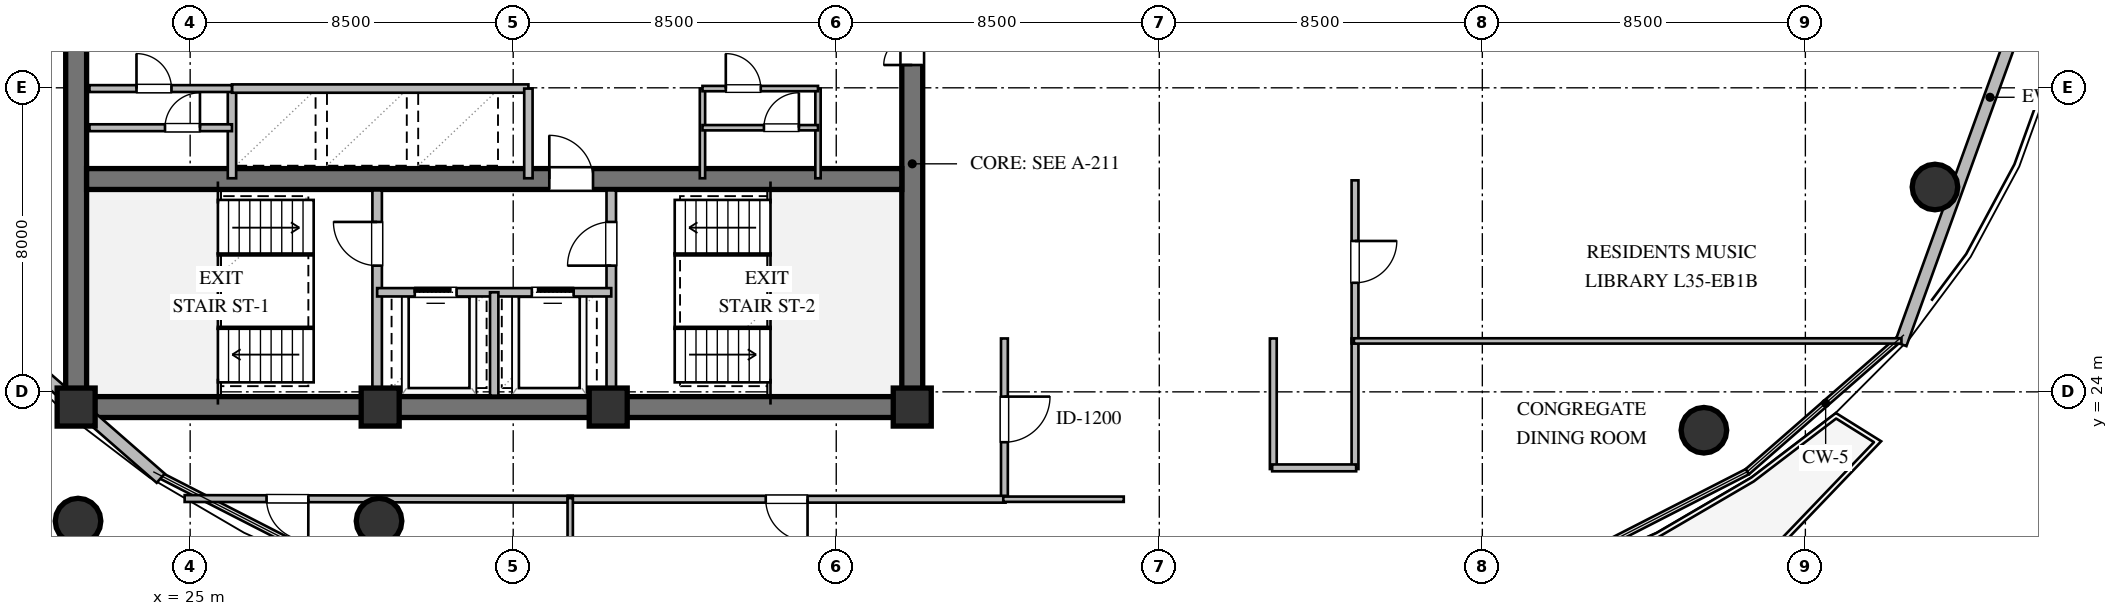
"""IFC4 building model, lengths in metres.
Left out: names, types, materials, properties, quantities, classifications, styles, units other than length and angle.
Written with IfcOpenShell. Run it as: python <this file> out.ifc"""

import sys

from ifc_helpers import new_model, si_unit, direction, frame, frame_2d, origin, origin_2d, place, context, subcontext, project, spatial, rectangle, circle, extrude, element, fill, save


model = new_model("IFC4")
c1 = context("Model", 3, precision=1e-05, world=origin(), true_north=direction((0.0, 1.0)))
c2 = subcontext(c1, "Body", "Model", "MODEL_VIEW")
j1 = project(units=[si_unit("LENGTHUNIT", "METRE"), si_unit("PLANEANGLEUNIT", "RADIAN")], contexts=[c1])
p1 = place(None, origin())
s1 = spatial("IfcSite", under=j1, at=p1, CompositionType="ELEMENT")
p2 = place(p1, origin())
s2 = spatial("IfcBuilding", under=s1, at=p2, CompositionType="ELEMENT")
p3 = place(p2, frame((0.0, 0.0, 135.0)))
s3 = spatial("IfcBuildingStorey", under=s2, at=p3, CompositionType="ELEMENT", Elevation=135.0)
p4 = place(p3, frame((21.725, 23.6, 0.0), z_axis=(0.0, 0.0, 1.0), x_axis=(1.0, 0.0, 0.0)))
e1 = element("IfcWall", 1, at=p4, inside=s3, PredefinedType="SHEAR", context=c2, shape_type="SweptSolid", body=[
    extrude(rectangle(XDim=22.55, YDim=0.55, at=frame_2d((11.275, 0.0))), origin(), (0.0, 0.0, 1.0), 3.36),
])
p5 = place(p3, frame((22.0, 23.875, 0.0), z_axis=(0.0, 0.0, 1.0), x_axis=(0.0, 1.0, 0.0)))
e2 = element("IfcWall", 2, at=p5, inside=s3, PredefinedType="SHEAR", context=c2, shape_type="SweptSolid", body=[
    extrude(rectangle(XDim=12.25, YDim=0.55, at=frame_2d((6.125, 0.0))), origin(), (0.0, 0.0, 1.0), 3.36),
])
p6 = place(p3, frame((44.0, 23.875, 0.0), z_axis=(0.0, 0.0, 1.0), x_axis=(0.0, 1.0, 0.0)))
e3 = element("IfcWall", 3, at=p6, inside=s3, PredefinedType="SHEAR", context=c2, shape_type="SweptSolid", body=[
    extrude(rectangle(XDim=12.25, YDim=0.55, at=frame_2d((6.125, 0.0))), origin(), (0.0, 0.0, 1.0), 3.36),
])
p7 = place(p6, frame((8.725, 0.0, 0.0)))
e4 = element("IfcOpeningElement", 4, at=p7, cuts=e3, PredefinedType="OPENING", context=c2, shape_type="SweptSolid", body=[
    extrude(rectangle(XDim=1.5, YDim=2.15, at=frame_2d((0.75, 1.075))), frame((0.0, 0.285, 0.0), z_axis=(0.0, -1.0, 0.0), x_axis=(1.0, 0.0, 0.0)), (0.0, 0.0, 1.0), 0.57),
])
p8 = place(p3, frame((22.275, 29.6, 0.0), z_axis=(0.0, 0.0, 1.0), x_axis=(1.0, 0.0, 0.0)))
e5 = element("IfcWall", 5, at=p8, inside=s3, PredefinedType="SHEAR", context=c2, shape_type="SweptSolid", body=[
    extrude(rectangle(XDim=21.45, YDim=0.55, at=frame_2d((10.725, 0.0))), origin(), (0.0, 0.0, 1.0), 3.36),
])
p9 = place(p8, frame((12.175, 0.0, 0.0)))
e6 = element("IfcOpeningElement", 6, at=p9, cuts=e5, PredefinedType="OPENING", context=c2, shape_type="SweptSolid", body=[
    extrude(rectangle(XDim=1.15, YDim=2.1, at=frame_2d((0.575, 1.05))), frame((0.0, 0.285, 0.0), z_axis=(0.0, -1.0, 0.0), x_axis=(1.0, 0.0, 0.0)), (0.0, 0.0, 1.0), 0.57),
])
for number, where, z_axis, x_axis in (
    (7, (22.0, 23.6, 0.0), (0.0, 0.0, 1.0), (1.0, 0.0, 0.0)),
    (8, (30.0, 23.6, 0.0), (0.0, 0.0, 1.0), (1.0, 0.0, 0.0)),
    (9, (36.0, 23.6, 0.0), (0.0, 0.0, 1.0), (1.0, 0.0, 0.0)),
    (10, (44.0, 23.6, 0.0), (0.0, 0.0, 1.0), (1.0, 0.0, 0.0)),
):
    element("IfcColumn", number, at=place(p3, frame(where, z_axis=z_axis, x_axis=x_axis)), inside=s3, PredefinedType="COLUMN", context=c2, shape_type="SweptSolid", body=[
        extrude(rectangle(XDim=1.0, YDim=1.0, at=origin_2d()), origin(), (0.0, 0.0, 1.0), 3.6),
    ])
for number, where, z_axis, x_axis in (
    (11, (22.05, 20.6, 0.0), (0.0, 0.0, 1.0), (1.0, 0.0, 0.0)),
    (12, (29.97, 20.6, 0.0), (0.0, 0.0, 1.0), (1.0, 0.0, 0.0)),
    (13, (64.83, 22.99, 0.0), (0.0, 0.0, 1.0), (1.0, 0.0, 0.0)),
    (14, (70.91, 29.39, 0.0), (0.0, 0.0, 1.0), (1.0, 0.0, 0.0)),
):
    element("IfcColumn", number, at=place(p3, frame(where, z_axis=z_axis, x_axis=x_axis)), inside=s3, PredefinedType="COLUMN", context=c2, shape_type="SweptSolid", body=[
        extrude(circle(Radius=0.6, at=origin_2d()), origin(), (0.0, 0.0, 1.0), 3.6),
    ])
p10 = place(p3, frame((74.708, 38.244, 0.0), z_axis=(0.0, 0.0, 1.0), x_axis=(-0.340324669139, -0.94030799187, 0.0)))
e15 = element("IfcWall", 15, at=p10, inside=s3, PredefinedType="STANDARD", context=c2, shape_type="SweptSolid", body=[
    extrude(rectangle(XDim=13.81, YDim=0.32, at=frame_2d((6.905, 0.0))), origin(), (0.0, 0.0, 1.0), 3.36),
])
p11 = place(p3, frame((24.225, 21.727, 0.0), z_axis=(0.0, 0.0, 1.0), x_axis=(-0.753105964003, 0.657899237713, 0.0)))
e16 = element("IfcWall", 16, at=p11, inside=s3, PredefinedType="STANDARD", context=c2, shape_type="SweptSolid", body=[
    extrude(rectangle(XDim=5.998, YDim=0.32, at=frame_2d((2.999, 0.0))), origin(), (0.0, 0.0, 1.0), 2.35),
])
p12 = place(p3, frame((29.92, 23.9, 0.0), z_axis=(0.0, 0.0, 1.0), x_axis=(0.0, 1.0, 0.0)))
e17 = element("IfcWall", 17, at=p12, inside=s3, PredefinedType="SOLIDWALL", context=c2, shape_type="SweptSolid", body=[
    extrude(rectangle(XDim=5.4, YDim=0.25, at=frame_2d((2.7, 0.0))), origin(), (0.0, 0.0, 1.0), 2.89),
])
p13 = place(p12, frame((3.421, 0.0, 0.0)))
e18 = element("IfcOpeningElement", 18, at=p13, cuts=e17, PredefinedType="OPENING", context=c2, shape_type="SweptSolid", body=[
    extrude(rectangle(XDim=1.15, YDim=2.1, at=frame_2d((0.575, 1.05))), frame((0.0, 0.135, 0.0), z_axis=(0.0, -1.0, 0.0), x_axis=(1.0, 0.0, 0.0)), (0.0, 0.0, 1.0), 0.27),
])
p14 = place(p3, frame((36.08, 23.9, 0.0), z_axis=(0.0, 0.0, 1.0), x_axis=(0.0, 1.0, 0.0)))
e19 = element("IfcWall", 19, at=p14, inside=s3, PredefinedType="SOLIDWALL", context=c2, shape_type="SweptSolid", body=[
    extrude(rectangle(XDim=5.4, YDim=0.25, at=frame_2d((2.7, 0.0))), origin(), (0.0, 0.0, 1.0), 3.36),
])
p15 = place(p14, frame((3.421, 0.0, 0.0)))
e20 = element("IfcOpeningElement", 20, at=p15, cuts=e19, PredefinedType="OPENING", context=c2, shape_type="SweptSolid", body=[
    extrude(rectangle(XDim=1.15, YDim=2.1, at=frame_2d((0.575, 1.05))), frame((0.0, 0.135, 0.0), z_axis=(0.0, -1.0, 0.0), x_axis=(1.0, 0.0, 0.0)), (0.0, 0.0, 1.0), 0.27),
])
p16 = place(p3, frame((29.92, 26.62, 0.0), z_axis=(0.0, 0.0, 1.0), x_axis=(1.0, 0.0, 0.0)))
e21 = element("IfcWall", 21, at=p16, inside=s3, PredefinedType="SOLIDWALL", context=c2, shape_type="SweptSolid", body=[
    extrude(rectangle(XDim=6.16, YDim=0.22, at=frame_2d((3.08, 0.0))), origin(), (0.0, 0.0, 1.0), 3.36),
])
p17 = place(p16, frame((0.99, 0.0, 0.0)))
e22 = element("IfcOpeningElement", 22, at=p17, cuts=e21, PredefinedType="OPENING", context=c2, shape_type="SweptSolid", body=[
    extrude(rectangle(XDim=1.1, YDim=2.1, at=frame_2d((0.55, 1.05))), frame((0.0, 0.12, 0.0), z_axis=(0.0, -1.0, 0.0), x_axis=(1.0, 0.0, 0.0)), (0.0, 0.0, 1.0), 0.24),
])
p18 = place(p16, frame((4.07, 0.0, 0.0)))
e23 = element("IfcOpeningElement", 23, at=p18, cuts=e21, PredefinedType="OPENING", context=c2, shape_type="SweptSolid", body=[
    extrude(rectangle(XDim=1.1, YDim=2.1, at=frame_2d((0.55, 1.05))), frame((0.0, 0.12, 0.0), z_axis=(0.0, -1.0, 0.0), x_axis=(1.0, 0.0, 0.0)), (0.0, 0.0, 1.0), 0.24),
])
p19 = place(p3, frame((33.0, 23.9, 0.0), z_axis=(0.0, 0.0, 1.0), x_axis=(0.0, 1.0, 0.0)))
e24 = element("IfcWall", 24, at=p19, inside=s3, PredefinedType="SOLIDWALL", context=c2, shape_type="SweptSolid", body=[
    extrude(rectangle(XDim=2.72, YDim=0.22, at=frame_2d((1.36, 0.0))), origin(), (0.0, 0.0, 1.0), 3.36),
])
p20 = place(p3, frame((26.1, 29.62, 0.0), z_axis=(0.0, 0.0, 1.0), x_axis=(0.0, 1.0, 0.0)))
e25 = element("IfcWall", 25, at=p20, inside=s3, PredefinedType="SOLIDWALL", context=c2, shape_type="SweptSolid", body=[
    extrude(rectangle(XDim=2.36, YDim=0.22, at=frame_2d((1.18, 0.0))), origin(), (0.0, 0.0, 1.0), 3.36),
])
p21 = place(p3, frame((26.1, 31.98, 0.0), z_axis=(0.0, 0.0, 1.0), x_axis=(1.0, 0.0, 0.0)))
e26 = element("IfcWall", 26, at=p21, inside=s3, PredefinedType="SOLIDWALL", context=c2, shape_type="SweptSolid", body=[
    extrude(rectangle(XDim=7.8, YDim=0.22, at=frame_2d((3.9, 0.0))), origin(), (0.0, 0.0, 1.0), 3.36),
])
p22 = place(p3, frame((33.9, 29.62, 0.0), z_axis=(0.0, 0.0, 1.0), x_axis=(0.0, 1.0, 0.0)))
e27 = element("IfcWall", 27, at=p22, inside=s3, PredefinedType="SOLIDWALL", context=c2, shape_type="SweptSolid", body=[
    extrude(rectangle(XDim=2.36, YDim=0.22, at=frame_2d((1.18, 0.0))), origin(), (0.0, 0.0, 1.0), 3.36),
])
p23 = place(p3, frame((22.35, 30.95, 0.0), z_axis=(0.0, 0.0, 1.0), x_axis=(1.0, 0.0, 0.0)))
e28 = element("IfcWall", 28, at=p23, inside=s3, PredefinedType="PARTITIONING", context=c2, shape_type="SweptSolid", body=[
    extrude(rectangle(XDim=3.75, YDim=0.18, at=frame_2d((1.875, 0.0))), origin(), (0.0, 0.0, 1.0), 3.36),
])
p24 = place(p23, frame((1.988, 0.0, 0.0)))
e29 = element("IfcOpeningElement", 29, at=p24, cuts=e28, PredefinedType="OPENING", context=c2, shape_type="SweptSolid", body=[
    extrude(rectangle(XDim=0.92, YDim=2.1, at=frame_2d((0.46, 1.05))), frame((0.0, 0.1, 0.0), z_axis=(0.0, -1.0, 0.0), x_axis=(1.0, 0.0, 0.0)), (0.0, 0.0, 1.0), 0.2),
])
p25 = place(p3, frame((22.35, 31.98, 0.0), z_axis=(0.0, 0.0, 1.0), x_axis=(1.0, 0.0, 0.0)))
e30 = element("IfcWall", 30, at=p25, inside=s3, PredefinedType="PARTITIONING", context=c2, shape_type="SweptSolid", body=[
    extrude(rectangle(XDim=3.75, YDim=0.18, at=frame_2d((1.875, 0.0))), origin(), (0.0, 0.0, 1.0), 3.36),
])
p26 = place(p25, frame((1.238, 0.0, 0.0)))
e31 = element("IfcOpeningElement", 31, at=p26, cuts=e30, PredefinedType="OPENING", context=c2, shape_type="SweptSolid", body=[
    extrude(rectangle(XDim=0.92, YDim=2.1, at=frame_2d((0.46, 1.05))), frame((0.0, 0.1, 0.0), z_axis=(0.0, -1.0, 0.0), x_axis=(1.0, 0.0, 0.0)), (0.0, 0.0, 1.0), 0.2),
])
for number, where, z_axis, x_axis in (
    (32, (38.48, 29.62, 0.0), (0.0, 0.0, 1.0), (0.0, 1.0, 0.0)),
    (33, (41.52, 29.62, 0.0), (0.0, 0.0, 1.0), (0.0, 1.0, 0.0)),
):
    element("IfcWall", number, at=place(p3, frame(where, z_axis=z_axis, x_axis=x_axis)), inside=s3, PredefinedType="PARTITIONING", context=c2, shape_type="SweptSolid", body=[
        extrude(rectangle(XDim=2.36, YDim=0.14, at=frame_2d((1.18, 0.0))), origin(), (0.0, 0.0, 1.0), 3.36),
    ])
p27 = place(p3, frame((38.48, 30.95, 0.0), z_axis=(0.0, 0.0, 1.0), x_axis=(1.0, 0.0, 0.0)))
e34 = element("IfcWall", 34, at=p27, inside=s3, PredefinedType="PARTITIONING", context=c2, shape_type="SweptSolid", body=[
    extrude(rectangle(XDim=3.04, YDim=0.14, at=frame_2d((1.52, 0.0))), origin(), (0.0, 0.0, 1.0), 3.36),
])
p28 = place(p27, frame((1.617, 0.0, 0.0)))
e35 = element("IfcOpeningElement", 35, at=p28, cuts=e34, PredefinedType="OPENING", context=c2, shape_type="SweptSolid", body=[
    extrude(rectangle(XDim=0.92, YDim=2.1, at=frame_2d((0.46, 1.05))), frame((0.0, 0.08, 0.0), z_axis=(0.0, -1.0, 0.0), x_axis=(1.0, 0.0, 0.0)), (0.0, 0.0, 1.0), 0.16),
])
p29 = place(p3, frame((38.48, 31.98, 0.0), z_axis=(0.0, 0.0, 1.0), x_axis=(1.0, 0.0, 0.0)))
e36 = element("IfcWall", 36, at=p29, inside=s3, PredefinedType="PARTITIONING", context=c2, shape_type="SweptSolid", body=[
    extrude(rectangle(XDim=3.04, YDim=0.14, at=frame_2d((1.52, 0.0))), origin(), (0.0, 0.0, 1.0), 3.36),
])
p30 = place(p29, frame((0.614, 0.0, 0.0)))
e37 = element("IfcOpeningElement", 37, at=p30, cuts=e36, PredefinedType="OPENING", context=c2, shape_type="SweptSolid", body=[
    extrude(rectangle(XDim=0.92, YDim=2.1, at=frame_2d((0.46, 1.05))), frame((0.0, 0.08, 0.0), z_axis=(0.0, -1.0, 0.0), x_axis=(1.0, 0.0, 0.0)), (0.0, 0.0, 1.0), 0.16),
])
p31 = place(p3, frame((46.425, 25.405, 0.0), z_axis=(0.0, 0.0, 1.0), x_axis=(0.0, -1.0, 0.0)))
e38 = element("IfcWall", 38, at=p31, inside=s3, PredefinedType="PARTITIONING", context=c2, shape_type="SweptSolid", body=[
    extrude(rectangle(XDim=4.26, YDim=0.18, at=frame_2d((2.13, 0.0))), origin(), (0.0, 0.0, 1.0), 3.36),
])
p32 = place(p31, frame((1.53, 0.0, 0.0)))
e39 = element("IfcOpeningElement", 39, at=p32, cuts=e38, PredefinedType="OPENING", context=c2, shape_type="SweptSolid", body=[
    extrude(rectangle(XDim=1.2, YDim=2.15, at=frame_2d((0.6, 1.075))), frame((0.0, 0.1, 0.0), z_axis=(0.0, -1.0, 0.0), x_axis=(1.0, 0.0, 0.0)), (0.0, 0.0, 1.0), 0.2),
])
for number, where, z_axis, x_axis in (
    (40, (55.65, 25.405, 0.0), (0.0, 0.0, 1.0), (0.0, -1.0, 0.0)),
    (41, (53.5, 21.97, 0.0), (0.0, 0.0, 1.0), (0.0, 1.0, 0.0)),
):
    element("IfcWall", number, at=place(p3, frame(where, z_axis=z_axis, x_axis=x_axis)), inside=s3, PredefinedType="PARTITIONING", context=c2, shape_type="SweptSolid", body=[
        extrude(rectangle(XDim=3.435, YDim=0.18, at=frame_2d((1.718, 0.0))), origin(), (0.0, 0.0, 1.0), 3.36),
    ])
p33 = place(p3, frame((55.68, 22.0, 0.0), z_axis=(0.0, 0.0, 1.0), x_axis=(-1.0, 0.0, 0.0)))
e42 = element("IfcWall", 42, at=p33, inside=s3, PredefinedType="PARTITIONING", context=c2, shape_type="SweptSolid", body=[
    extrude(rectangle(XDim=2.21, YDim=0.18, at=frame_2d((1.105, 0.0))), origin(), (0.0, 0.0, 1.0), 3.36),
])
p34 = place(p3, frame((55.65, 29.565, 0.0), z_axis=(0.0, 0.0, 1.0), x_axis=(0.0, -1.0, 0.0)))
e43 = element("IfcWall", 43, at=p34, inside=s3, PredefinedType="PARTITIONING", context=c2, shape_type="SweptSolid", body=[
    extrude(rectangle(XDim=4.29, YDim=0.18, at=frame_2d((2.145, 0.0))), origin(), (0.0, 0.0, 1.0), 3.36),
])
p35 = place(p34, frame((1.595, 0.0, 0.0)))
e44 = element("IfcOpeningElement", 44, at=p35, cuts=e43, PredefinedType="OPENING", context=c2, shape_type="SweptSolid", body=[
    extrude(rectangle(XDim=1.1, YDim=2.1, at=frame_2d((0.55, 1.05))), frame((0.0, 0.1, 0.0), z_axis=(0.0, -1.0, 0.0), x_axis=(1.0, 0.0, 0.0)), (0.0, 0.0, 1.0), 0.2),
])
p36 = place(p3, frame((35.065, 21.175, 0.0), z_axis=(0.0, 0.0, 1.0), x_axis=(-0.999998434459, 0.001769485513, 0.0)))
e45 = element("IfcWall", 45, at=p36, inside=s3, PredefinedType="PARTITIONING", context=c2, shape_type="SweptSolid", body=[
    extrude(rectangle(XDim=10.21, YDim=0.18, at=frame_2d((5.105, 0.0))), origin(), (0.0, 0.0, 1.0), 2.657),
])
p37 = place(p36, frame((6.955, 0.0, 0.0)))
e46 = element("IfcOpeningElement", 46, at=p37, cuts=e45, PredefinedType="OPENING", context=c2, shape_type="SweptSolid", body=[
    extrude(rectangle(XDim=1.1, YDim=2.1, at=frame_2d((0.55, 1.05))), frame((0.0, 0.1, 0.0), z_axis=(0.0, -1.0, 0.0), x_axis=(1.0, 0.0, 0.0)), (0.0, 0.0, 1.0), 0.2),
])
p38 = place(p3, frame((46.455, 21.175, 0.0), z_axis=(0.0, 0.0, 1.0), x_axis=(-1.0, 0.0, 0.0)))
e47 = element("IfcWall", 47, at=p38, inside=s3, PredefinedType="PARTITIONING", context=c2, shape_type="SweptSolid", body=[
    extrude(rectangle(XDim=11.52, YDim=0.18, at=frame_2d((5.76, 0.0))), origin(), (0.0, 0.0, 1.0), 2.996),
])
p39 = place(p38, frame((5.21, 0.0, 0.0)))
e48 = element("IfcOpeningElement", 48, at=p39, cuts=e47, PredefinedType="OPENING", context=c2, shape_type="SweptSolid", body=[
    extrude(rectangle(XDim=1.1, YDim=2.1, at=frame_2d((0.55, 1.05))), frame((0.0, 0.1, 0.0), z_axis=(0.0, -1.0, 0.0), x_axis=(1.0, 0.0, 0.0)), (0.0, 0.0, 1.0), 0.2),
])
p40 = place(p3, frame((55.62, 25.34, 0.0), z_axis=(0.0, 0.0, 1.0), x_axis=(1.0, 0.0, 0.0)))
e49 = element("IfcWall", 49, at=p40, inside=s3, PredefinedType="PARTITIONING", context=c2, shape_type="SweptSolid", body=[
    extrude(rectangle(XDim=14.407, YDim=0.14, at=frame_2d((7.204, 0.0))), origin(), (0.0, 0.0, 1.0), 3.36),
])
p41 = place(p3, frame((49.565, 21.175, 0.0), z_axis=(0.0, 0.0, 1.0), x_axis=(-1.0, 0.0, 0.0)))
e50 = element("IfcWall", 50, at=p41, inside=s3, PredefinedType="PARTITIONING", context=c2, shape_type="SweptSolid", body=[
    extrude(rectangle(XDim=3.17, YDim=0.14, at=frame_2d((1.585, 0.0))), origin(), (0.0, 0.0, 1.0), 2.996),
])
p42 = place(p3, frame((35.0, 21.205, 0.0), z_axis=(0.0, 0.0, 1.0), x_axis=(0.0, -1.0, 0.0)))
e51 = element("IfcWall", 51, at=p42, inside=s3, PredefinedType="PARTITIONING", context=c2, shape_type="SweptSolid", body=[
    extrude(rectangle(XDim=3.614, YDim=0.14, at=frame_2d((1.807, 0.0))), origin(), (0.0, 0.0, 1.0), 3.36),
])
p43 = place(p13, origin())
e52 = element("IfcDoor", 52, at=p43, inside=s3, OperationType="SINGLE_SWING_RIGHT", PredefinedType="DOOR", context=c2, shape_type="SweptSolid", body=[
    extrude(rectangle(XDim=1.15, YDim=2.1, at=frame_2d((0.575, 1.05))), frame((0.0, 0.025, 0.0), z_axis=(0.0, -1.0, 0.0), x_axis=(1.0, 0.0, 0.0)), (0.0, 0.0, 1.0), 0.05),
])
fill(e18, e52)
p44 = place(p15, origin())
e53 = element("IfcDoor", 53, at=p44, inside=s3, OperationType="SINGLE_SWING_LEFT", PredefinedType="DOOR", context=c2, shape_type="SweptSolid", body=[
    extrude(rectangle(XDim=1.15, YDim=2.1, at=frame_2d((0.575, 1.05))), frame((0.0, 0.025, 0.0), z_axis=(0.0, -1.0, 0.0), x_axis=(1.0, 0.0, 0.0)), (0.0, 0.0, 1.0), 0.05),
])
fill(e20, e53)
p45 = place(p17, origin())
e54 = element("IfcDoor", 54, at=p45, inside=s3, OperationType="SLIDING_TO_LEFT", PredefinedType="DOOR", context=c2, shape_type="SweptSolid", body=[
    extrude(rectangle(XDim=1.1, YDim=2.1, at=frame_2d((0.55, 1.05))), frame((0.0, 0.025, 0.0), z_axis=(0.0, -1.0, 0.0), x_axis=(1.0, 0.0, 0.0)), (0.0, 0.0, 1.0), 0.05),
])
fill(e22, e54)
p46 = place(p18, origin())
e55 = element("IfcDoor", 55, at=p46, inside=s3, OperationType="SLIDING_TO_RIGHT", PredefinedType="DOOR", context=c2, shape_type="SweptSolid", body=[
    extrude(rectangle(XDim=1.1, YDim=2.1, at=frame_2d((0.55, 1.05))), frame((0.0, 0.025, 0.0), z_axis=(0.0, -1.0, 0.0), x_axis=(1.0, 0.0, 0.0)), (0.0, 0.0, 1.0), 0.05),
])
fill(e23, e55)
p47 = place(p9, origin())
e56 = element("IfcDoor", 56, at=p47, inside=s3, OperationType="SINGLE_SWING_LEFT", PredefinedType="DOOR", context=c2, shape_type="SweptSolid", body=[
    extrude(rectangle(XDim=1.15, YDim=2.1, at=frame_2d((0.575, 1.05))), frame((0.0, 0.025, 0.0), z_axis=(0.0, -1.0, 0.0), x_axis=(1.0, 0.0, 0.0)), (0.0, 0.0, 1.0), 0.05),
])
fill(e6, e56)
p48 = place(p7, origin())
e57 = element("IfcDoor", 57, at=p48, inside=s3, OperationType="DOUBLE_DOOR_SINGLE_SWING", PredefinedType="DOOR", context=c2, shape_type="SweptSolid", body=[
    extrude(rectangle(XDim=1.5, YDim=2.15, at=frame_2d((0.75, 1.075))), frame((0.0, 0.025, 0.0), z_axis=(0.0, -1.0, 0.0), x_axis=(1.0, 0.0, 0.0)), (0.0, 0.0, 1.0), 0.05),
])
fill(e4, e57)
p49 = place(p26, origin())
e58 = element("IfcDoor", 58, at=p49, inside=s3, OperationType="SINGLE_SWING_LEFT", PredefinedType="DOOR", context=c2, shape_type="SweptSolid", body=[
    extrude(rectangle(XDim=0.92, YDim=2.1, at=frame_2d((0.46, 1.05))), frame((0.0, 0.025, 0.0), z_axis=(0.0, -1.0, 0.0), x_axis=(1.0, 0.0, 0.0)), (0.0, 0.0, 1.0), 0.05),
])
fill(e31, e58)
p50 = place(p24, origin())
e59 = element("IfcDoor", 59, at=p50, inside=s3, OperationType="SINGLE_SWING_RIGHT", PredefinedType="DOOR", context=c2, shape_type="SweptSolid", body=[
    extrude(rectangle(XDim=0.92, YDim=2.1, at=frame_2d((0.46, 1.05))), frame((0.0, 0.025, 0.0), z_axis=(0.0, -1.0, 0.0), x_axis=(1.0, 0.0, 0.0)), (0.0, 0.0, 1.0), 0.05),
])
fill(e29, e59)
p51 = place(p30, origin())
e60 = element("IfcDoor", 60, at=p51, inside=s3, OperationType="SINGLE_SWING_LEFT", PredefinedType="DOOR", context=c2, shape_type="SweptSolid", body=[
    extrude(rectangle(XDim=0.92, YDim=2.1, at=frame_2d((0.46, 1.05))), frame((0.0, 0.025, 0.0), z_axis=(0.0, -1.0, 0.0), x_axis=(1.0, 0.0, 0.0)), (0.0, 0.0, 1.0), 0.05),
])
fill(e37, e60)
p52 = place(p28, origin())
e61 = element("IfcDoor", 61, at=p52, inside=s3, OperationType="SINGLE_SWING_RIGHT", PredefinedType="DOOR", context=c2, shape_type="SweptSolid", body=[
    extrude(rectangle(XDim=0.92, YDim=2.1, at=frame_2d((0.46, 1.05))), frame((0.0, 0.025, 0.0), z_axis=(0.0, -1.0, 0.0), x_axis=(1.0, 0.0, 0.0)), (0.0, 0.0, 1.0), 0.05),
])
fill(e35, e61)
p53 = place(p32, origin())
e62 = element("IfcDoor", 62, at=p53, inside=s3, OperationType="SINGLE_SWING_LEFT", PredefinedType="DOOR", context=c2, shape_type="SweptSolid", body=[
    extrude(rectangle(XDim=1.2, YDim=2.15, at=frame_2d((0.6, 1.075))), frame((0.0, 0.025, 0.0), z_axis=(0.0, -1.0, 0.0), x_axis=(1.0, 0.0, 0.0)), (0.0, 0.0, 1.0), 0.05),
])
fill(e39, e62)
p54 = place(p35, origin())
e63 = element("IfcDoor", 63, at=p54, inside=s3, OperationType="SINGLE_SWING_LEFT", PredefinedType="DOOR", context=c2, shape_type="SweptSolid", body=[
    extrude(rectangle(XDim=1.1, YDim=2.1, at=frame_2d((0.55, 1.05))), frame((0.0, 0.025, 0.0), z_axis=(0.0, -1.0, 0.0), x_axis=(1.0, 0.0, 0.0)), (0.0, 0.0, 1.0), 0.05),
])
fill(e44, e63)
p55 = place(p37, origin())
e64 = element("IfcDoor", 64, at=p55, inside=s3, OperationType="SINGLE_SWING_LEFT", PredefinedType="DOOR", context=c2, shape_type="SweptSolid", body=[
    extrude(rectangle(XDim=1.1, YDim=2.1, at=frame_2d((0.55, 1.05))), frame((0.0, 0.025, 0.0), z_axis=(0.0, -1.0, 0.0), x_axis=(1.0, 0.0, 0.0)), (0.0, 0.0, 1.0), 0.05),
])
fill(e46, e64)
p56 = place(p39, origin())
e65 = element("IfcDoor", 65, at=p56, inside=s3, OperationType="SINGLE_SWING_LEFT", PredefinedType="DOOR", context=c2, shape_type="SweptSolid", body=[
    extrude(rectangle(XDim=1.1, YDim=2.1, at=frame_2d((0.55, 1.05))), frame((0.0, 0.025, 0.0), z_axis=(0.0, -1.0, 0.0), x_axis=(1.0, 0.0, 0.0)), (0.0, 0.0, 1.0), 0.05),
])
fill(e48, e65)
save(model, sys.argv[1])
